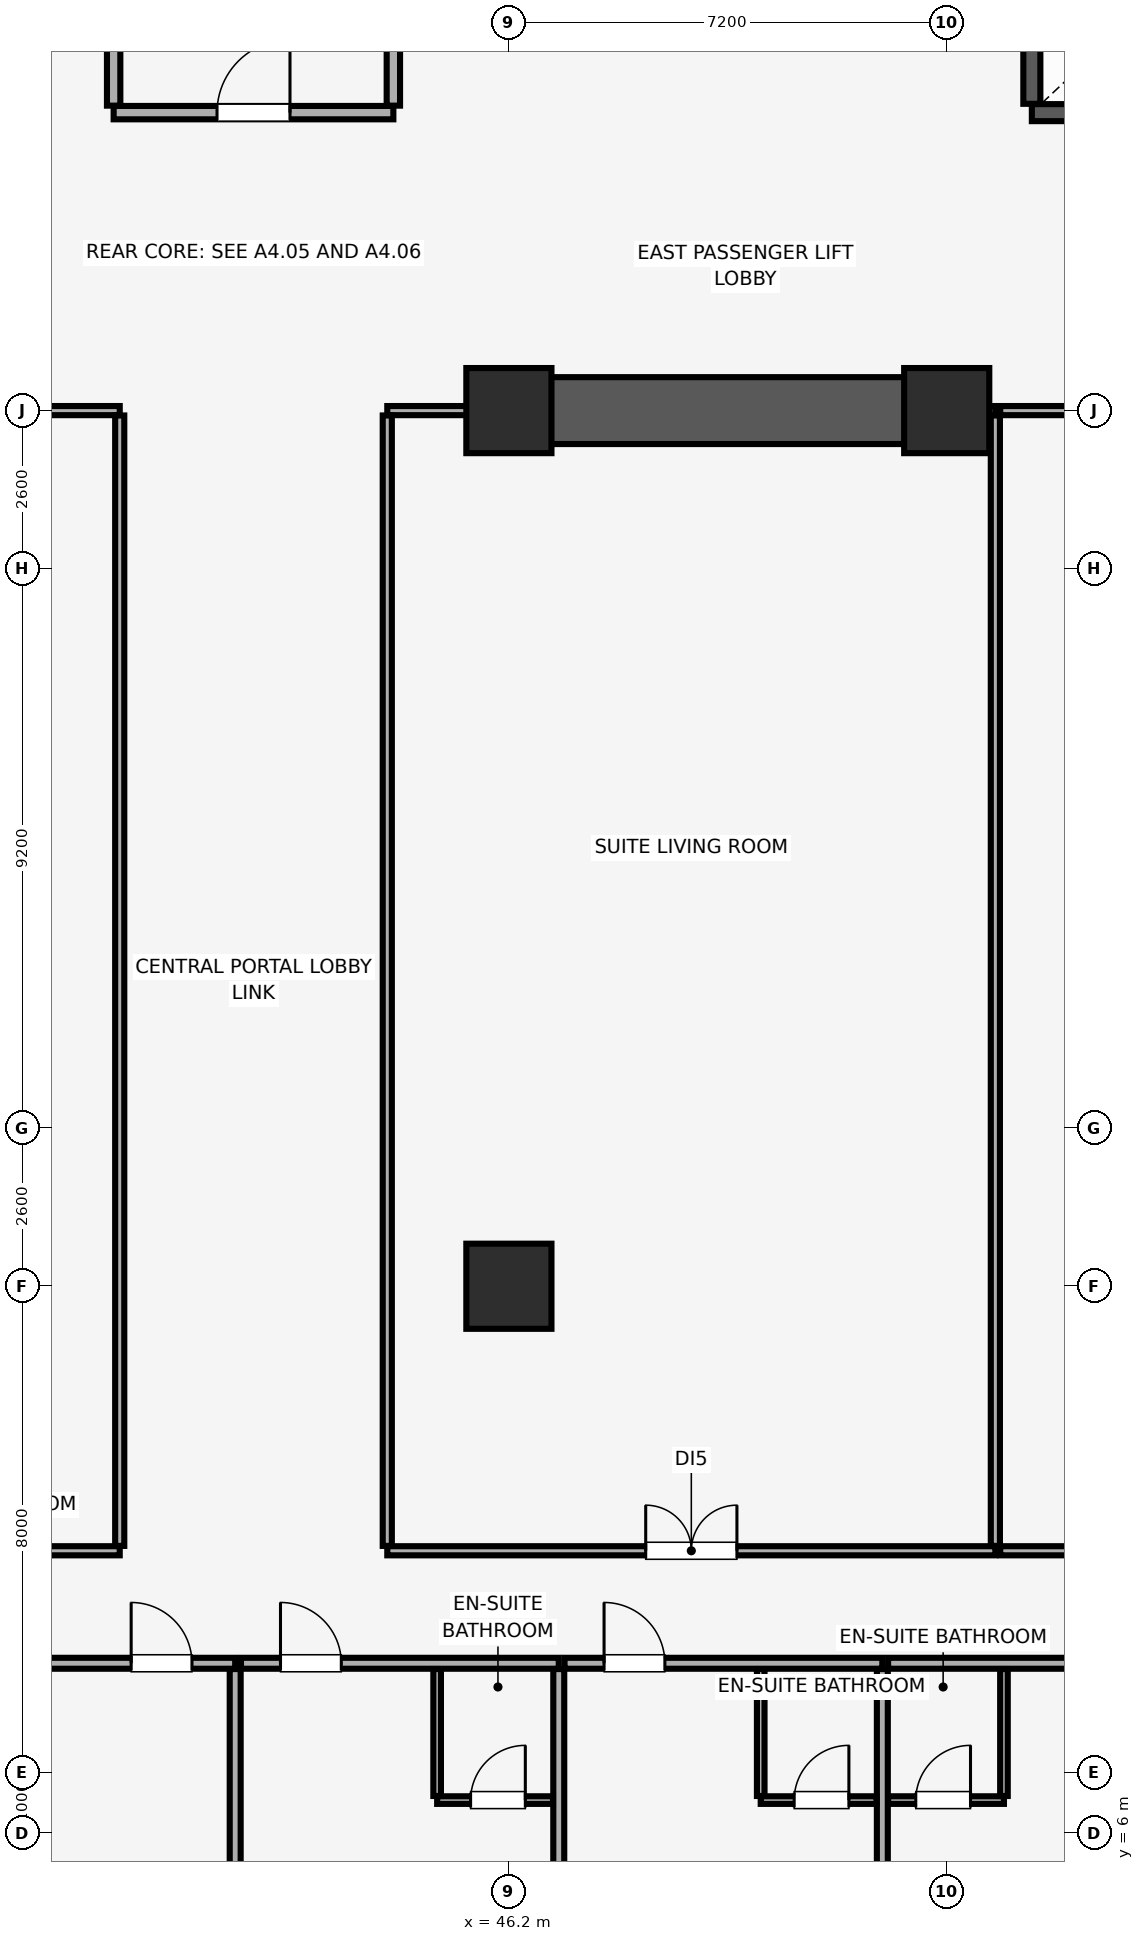
"""IFC4 building model, lengths in metres.
Left out: names, types, materials, properties, quantities, classifications, styles, units other than length and angle.
Written with IfcOpenShell. Run it as: python <this file> out.ifc"""

import sys

from ifc_helpers import new_model, si_unit, direction, frame, frame_2d, origin, origin_2d, place, context, subcontext, project, spatial, rectangle, extrude, element, fill, save


model = new_model("IFC4")
c1 = context("Model", 3, precision=1e-05, world=origin(), true_north=direction((0.0, 1.0)))
c2 = subcontext(c1, "Body", "Model", "MODEL_VIEW")
j1 = project(units=[si_unit("LENGTHUNIT", "METRE"), si_unit("PLANEANGLEUNIT", "RADIAN")], contexts=[c1])
p1 = place(None, origin())
s1 = spatial("IfcSite", under=j1, at=p1, CompositionType="ELEMENT")
p2 = place(p1, origin())
s2 = spatial("IfcBuilding", under=s1, at=p2, CompositionType="ELEMENT")
p3 = place(p2, frame((0.0, 0.0, 31.4)))
s3 = spatial("IfcBuildingStorey", under=s2, at=p3, CompositionType="ELEMENT", Elevation=31.4)
for number, where, z_axis, x_axis in (
    (1, (46.2, 15.0, 0.0), (0.0, 0.0, 1.0), (1.0, 0.0, 0.0)),
    (2, (46.2, 29.4, 0.0), (0.0, 0.0, 1.0), (1.0, 0.0, 0.0)),
    (3, (53.4, 29.4, 0.0), (0.0, 0.0, 1.0), (1.0, 0.0, 0.0)),
):
    element("IfcColumn", number, at=place(p3, frame(where, z_axis=z_axis, x_axis=x_axis)), inside=s3, PredefinedType="COLUMN", context=c2, shape_type="SweptSolid", body=[
        extrude(rectangle(XDim=1.4, YDim=1.4, at=origin_2d()), origin(), (0.0, 0.0, 1.0), 3.51),
    ])
p4 = place(p3, frame((46.0, 29.4, 0.0), z_axis=(0.0, 0.0, 1.0), x_axis=(1.0, 0.0, 0.0)))
e4 = element("IfcWall", 4, at=p4, inside=s3, PredefinedType="SHEAR", context=c2, shape_type="SweptSolid", body=[
    extrude(rectangle(XDim=7.6, YDim=1.1, at=frame_2d((3.8, 0.0))), origin(), (0.0, 0.0, 1.0), 3.51),
])
p5 = place(p3, frame((54.8, 34.3, 0.0), z_axis=(0.0, 0.0, 1.0), x_axis=(1.0, 0.0, 0.0)))
e5 = element("IfcWall", 5, at=p5, inside=s3, PredefinedType="SHEAR", context=c2, shape_type="SweptSolid", body=[
    extrude(rectangle(XDim=2.55, YDim=0.28, at=frame_2d((1.275, 0.0))), origin(), (0.0, 0.0, 1.0), 3.51),
])
p6 = place(p3, frame((54.8, 34.445, 0.0), z_axis=(0.0, 0.0, 1.0), x_axis=(0.0, 1.0, 0.0)))
e6 = element("IfcWall", 6, at=p6, inside=s3, PredefinedType="SHEAR", context=c2, shape_type="SweptSolid", body=[
    extrude(rectangle(XDim=2.11, YDim=0.28, at=frame_2d((1.055, 0.0))), origin(), (0.0, 0.0, 1.0), 3.51),
])
p7 = place(p3, frame((39.7, 34.3, 0.0), z_axis=(0.0, 0.0, 1.0), x_axis=(1.0, 0.0, 0.0)))
e7 = element("IfcWall", 7, at=p7, inside=s3, PredefinedType="PARTITIONING", context=c2, shape_type="SweptSolid", body=[
    extrude(rectangle(XDim=4.6, YDim=0.22, at=frame_2d((2.3, 0.0))), origin(), (0.0, 0.0, 1.0), 3.51),
])
p8 = place(p7, frame((1.7, 0.0, 0.0)))
e8 = element("IfcOpeningElement", 8, at=p8, cuts=e7, PredefinedType="OPENING", context=c2, shape_type="SweptSolid", body=[
    extrude(rectangle(XDim=1.2, YDim=2.15, at=frame_2d((0.6, 1.075))), frame((0.0, 0.12, 0.0), z_axis=(0.0, -1.0, 0.0), x_axis=(1.0, 0.0, 0.0)), (0.0, 0.0, 1.0), 0.24),
])
for number, where, z_axis, x_axis in (
    (9, (39.7, 34.415, 0.0), (0.0, 0.0, 1.0), (0.0, 1.0, 0.0)),
    (10, (44.3, 34.415, 0.0), (0.0, 0.0, 1.0), (0.0, 1.0, 0.0)),
):
    element("IfcWall", number, at=place(p3, frame(where, z_axis=z_axis, x_axis=x_axis)), inside=s3, PredefinedType="PARTITIONING", context=c2, shape_type="SweptSolid", body=[
        extrude(rectangle(XDim=5.785, YDim=0.22, at=frame_2d((2.893, 0.0))), origin(), (0.0, 0.0, 1.0), 3.51),
    ])
p9 = place(p3, frame((36.472, 8.8, 0.0), z_axis=(0.0, 0.0, 1.0), x_axis=(1.0, 0.0, 0.0)))
e11 = element("IfcWall", 11, at=p9, inside=s3, PredefinedType="PARTITIONING", context=c2, shape_type="SweptSolid", body=[
    extrude(rectangle(XDim=5.226, YDim=0.18, at=frame_2d((2.613, 0.0))), origin(), (0.0, 0.0, 1.0), 3.51),
])
p10 = place(p9, frame((3.516, 0.0, 0.0)))
e12 = element("IfcOpeningElement", 12, at=p10, cuts=e11, PredefinedType="OPENING", context=c2, shape_type="SweptSolid", body=[
    extrude(rectangle(XDim=1.0, YDim=2.15, at=frame_2d((0.5, 1.075))), frame((0.0, 0.1, 0.0), z_axis=(0.0, -1.0, 0.0), x_axis=(1.0, 0.0, 0.0)), (0.0, 0.0, 1.0), 0.2),
])
p11 = place(p3, frame((41.699, 0.15, 0.0), z_axis=(0.0, 0.0, 1.0), x_axis=(0.0, 1.0, 0.0)))
e13 = element("IfcWall", 13, at=p11, inside=s3, PredefinedType="PARTITIONING", context=c2, shape_type="SweptSolid", body=[
    extrude(rectangle(XDim=8.555, YDim=0.18, at=frame_2d((4.278, 0.0))), origin(), (0.0, 0.0, 1.0), 3.51),
])
p12 = place(p3, frame((41.794, 8.8, 0.0), z_axis=(0.0, 0.0, 1.0), x_axis=(1.0, 0.0, 0.0)))
e14 = element("IfcWall", 14, at=p12, inside=s3, PredefinedType="PARTITIONING", context=c2, shape_type="SweptSolid", body=[
    extrude(rectangle(XDim=5.226, YDim=0.18, at=frame_2d((2.613, 0.0))), origin(), (0.0, 0.0, 1.0), 3.51),
])
p13 = place(p12, frame((0.65, 0.0, 0.0)))
e15 = element("IfcOpeningElement", 15, at=p13, cuts=e14, PredefinedType="OPENING", context=c2, shape_type="SweptSolid", body=[
    extrude(rectangle(XDim=1.0, YDim=2.15, at=frame_2d((0.5, 1.075))), frame((0.0, 0.1, 0.0), z_axis=(0.0, -1.0, 0.0), x_axis=(1.0, 0.0, 0.0)), (0.0, 0.0, 1.0), 0.2),
])
p14 = place(p3, frame((47.02, 0.15, 0.0), z_axis=(0.0, 0.0, 1.0), x_axis=(0.0, 1.0, 0.0)))
e16 = element("IfcWall", 16, at=p14, inside=s3, PredefinedType="PARTITIONING", context=c2, shape_type="SweptSolid", body=[
    extrude(rectangle(XDim=8.555, YDim=0.18, at=frame_2d((4.278, 0.0))), origin(), (0.0, 0.0, 1.0), 3.51),
])
p15 = place(p3, frame((45.02, 6.55, 0.0), z_axis=(0.0, 0.0, 1.0), x_axis=(1.0, 0.0, 0.0)))
e17 = element("IfcWall", 17, at=p15, inside=s3, PredefinedType="PARTITIONING", context=c2, shape_type="SweptSolid", body=[
    extrude(rectangle(XDim=1.905, YDim=0.125, at=frame_2d((0.953, 0.0))), origin(), (0.0, 0.0, 1.0), 3.51),
])
p16 = place(p15, frame((0.55, 0.0, 0.0)))
e18 = element("IfcOpeningElement", 18, at=p16, cuts=e17, PredefinedType="OPENING", context=c2, shape_type="SweptSolid", body=[
    extrude(rectangle(XDim=0.9, YDim=2.1, at=frame_2d((0.45, 1.05))), frame((0.0, 0.073, 0.0), z_axis=(0.0, -1.0, 0.0), x_axis=(1.0, 0.0, 0.0)), (0.0, 0.0, 1.0), 0.145),
])
p17 = place(p3, frame((45.02, 6.617, 0.0), z_axis=(0.0, 0.0, 1.0), x_axis=(0.0, 1.0, 0.0)))
e19 = element("IfcWall", 19, at=p17, inside=s3, PredefinedType="PARTITIONING", context=c2, shape_type="SweptSolid", body=[
    extrude(rectangle(XDim=2.088, YDim=0.125, at=frame_2d((1.044, 0.0))), origin(), (0.0, 0.0, 1.0), 3.51),
])
p18 = place(p3, frame((47.115, 8.8, 0.0), z_axis=(0.0, 0.0, 1.0), x_axis=(1.0, 0.0, 0.0)))
e20 = element("IfcWall", 20, at=p18, inside=s3, PredefinedType="PARTITIONING", context=c2, shape_type="SweptSolid", body=[
    extrude(rectangle(XDim=5.226, YDim=0.18, at=frame_2d((2.613, 0.0))), origin(), (0.0, 0.0, 1.0), 3.51),
])
p19 = place(p18, frame((0.65, 0.0, 0.0)))
e21 = element("IfcOpeningElement", 21, at=p19, cuts=e20, PredefinedType="OPENING", context=c2, shape_type="SweptSolid", body=[
    extrude(rectangle(XDim=1.0, YDim=2.15, at=frame_2d((0.5, 1.075))), frame((0.0, 0.1, 0.0), z_axis=(0.0, -1.0, 0.0), x_axis=(1.0, 0.0, 0.0)), (0.0, 0.0, 1.0), 0.2),
])
p20 = place(p3, frame((52.341, 0.15, 0.0), z_axis=(0.0, 0.0, 1.0), x_axis=(0.0, 1.0, 0.0)))
e22 = element("IfcWall", 22, at=p20, inside=s3, PredefinedType="PARTITIONING", context=c2, shape_type="SweptSolid", body=[
    extrude(rectangle(XDim=8.555, YDim=0.18, at=frame_2d((4.278, 0.0))), origin(), (0.0, 0.0, 1.0), 3.51),
])
p21 = place(p3, frame((50.341, 6.55, 0.0), z_axis=(0.0, 0.0, 1.0), x_axis=(1.0, 0.0, 0.0)))
e23 = element("IfcWall", 23, at=p21, inside=s3, PredefinedType="PARTITIONING", context=c2, shape_type="SweptSolid", body=[
    extrude(rectangle(XDim=1.905, YDim=0.125, at=frame_2d((0.953, 0.0))), origin(), (0.0, 0.0, 1.0), 3.51),
])
p22 = place(p21, frame((0.55, 0.0, 0.0)))
e24 = element("IfcOpeningElement", 24, at=p22, cuts=e23, PredefinedType="OPENING", context=c2, shape_type="SweptSolid", body=[
    extrude(rectangle(XDim=0.9, YDim=2.1, at=frame_2d((0.45, 1.05))), frame((0.0, 0.073, 0.0), z_axis=(0.0, -1.0, 0.0), x_axis=(1.0, 0.0, 0.0)), (0.0, 0.0, 1.0), 0.145),
])
p23 = place(p3, frame((50.341, 6.617, 0.0), z_axis=(0.0, 0.0, 1.0), x_axis=(0.0, 1.0, 0.0)))
e25 = element("IfcWall", 25, at=p23, inside=s3, PredefinedType="PARTITIONING", context=c2, shape_type="SweptSolid", body=[
    extrude(rectangle(XDim=2.088, YDim=0.125, at=frame_2d((1.044, 0.0))), origin(), (0.0, 0.0, 1.0), 3.51),
])
p24 = place(p3, frame((52.436, 8.8, 0.0), z_axis=(0.0, 0.0, 1.0), x_axis=(1.0, 0.0, 0.0)))
e26 = element("IfcWall", 26, at=p24, inside=s3, PredefinedType="PARTITIONING", context=c2, shape_type="SweptSolid", body=[
    extrude(rectangle(XDim=5.226, YDim=0.18, at=frame_2d((2.613, 0.0))), origin(), (0.0, 0.0, 1.0), 3.51),
])
p25 = place(p24, frame((3.516, 0.0, 0.0)))
e27 = element("IfcOpeningElement", 27, at=p25, cuts=e26, PredefinedType="OPENING", context=c2, shape_type="SweptSolid", body=[
    extrude(rectangle(XDim=1.0, YDim=2.15, at=frame_2d((0.5, 1.075))), frame((0.0, 0.1, 0.0), z_axis=(0.0, -1.0, 0.0), x_axis=(1.0, 0.0, 0.0)), (0.0, 0.0, 1.0), 0.2),
])
p26 = place(p3, frame((52.436, 6.55, 0.0), z_axis=(0.0, 0.0, 1.0), x_axis=(1.0, 0.0, 0.0)))
e28 = element("IfcWall", 28, at=p26, inside=s3, PredefinedType="PARTITIONING", context=c2, shape_type="SweptSolid", body=[
    extrude(rectangle(XDim=1.905, YDim=0.125, at=frame_2d((0.953, 0.0))), origin(), (0.0, 0.0, 1.0), 3.51),
])
p27 = place(p26, frame((0.455, 0.0, 0.0)))
e29 = element("IfcOpeningElement", 29, at=p27, cuts=e28, PredefinedType="OPENING", context=c2, shape_type="SweptSolid", body=[
    extrude(rectangle(XDim=0.9, YDim=2.1, at=frame_2d((0.45, 1.05))), frame((0.0, 0.073, 0.0), z_axis=(0.0, -1.0, 0.0), x_axis=(1.0, 0.0, 0.0)), (0.0, 0.0, 1.0), 0.145),
])
p28 = place(p3, frame((54.341, 6.617, 0.0), z_axis=(0.0, 0.0, 1.0), x_axis=(0.0, 1.0, 0.0)))
e30 = element("IfcWall", 30, at=p28, inside=s3, PredefinedType="PARTITIONING", context=c2, shape_type="SweptSolid", body=[
    extrude(rectangle(XDim=2.088, YDim=0.125, at=frame_2d((1.044, 0.0))), origin(), (0.0, 0.0, 1.0), 3.51),
])
p29 = place(p3, frame((25.28, 10.65, 0.0), z_axis=(0.0, 0.0, 1.0), x_axis=(1.0, 0.0, 0.0)))
e31 = element("IfcWall", 31, at=p29, inside=s3, PredefinedType="PARTITIONING", context=c2, shape_type="SweptSolid", body=[
    extrude(rectangle(XDim=14.52, YDim=0.15, at=frame_2d((7.26, 0.0))), origin(), (0.0, 0.0, 1.0), 3.51),
])
p30 = place(p29, frame((6.47, 0.0, 0.0)))
e32 = element("IfcOpeningElement", 32, at=p30, cuts=e31, PredefinedType="OPENING", context=c2, shape_type="SweptSolid", body=[
    extrude(rectangle(XDim=1.5, YDim=2.25, at=frame_2d((0.75, 1.125))), frame((0.0, 0.085, 0.0), z_axis=(0.0, -1.0, 0.0), x_axis=(1.0, 0.0, 0.0)), (0.0, 0.0, 1.0), 0.17),
])
p31 = place(p3, frame((38.01, 29.4, 0.0), z_axis=(0.0, 0.0, 1.0), x_axis=(1.0, 0.0, 0.0)))
e33 = element("IfcWall", 33, at=p31, inside=s3, PredefinedType="PARTITIONING", context=c2, shape_type="SweptSolid", body=[
    extrude(rectangle(XDim=1.79, YDim=0.15, at=frame_2d((0.895, 0.0))), origin(), (0.0, 0.0, 1.0), 2.41),
])
p32 = place(p3, frame((39.8, 10.73, 0.0), z_axis=(0.0, 0.0, 1.0), x_axis=(0.0, 1.0, 0.0)))
e34 = element("IfcWall", 34, at=p32, inside=s3, PredefinedType="PARTITIONING", context=c2, shape_type="SweptSolid", body=[
    extrude(rectangle(XDim=18.59, YDim=0.15, at=frame_2d((9.295, 0.0))), origin(), (0.0, 0.0, 1.0), 3.51),
])
p33 = place(p3, frame((44.2, 10.65, 0.0), z_axis=(0.0, 0.0, 1.0), x_axis=(1.0, 0.0, 0.0)))
e35 = element("IfcWall", 35, at=p33, inside=s3, PredefinedType="PARTITIONING", context=c2, shape_type="SweptSolid", body=[
    extrude(rectangle(XDim=10.0, YDim=0.15, at=frame_2d((5.0, 0.0))), origin(), (0.0, 0.0, 1.0), 3.51),
])
p34 = place(p33, frame((4.25, 0.0, 0.0)))
e36 = element("IfcOpeningElement", 36, at=p34, cuts=e35, PredefinedType="OPENING", context=c2, shape_type="SweptSolid", body=[
    extrude(rectangle(XDim=1.5, YDim=2.25, at=frame_2d((0.75, 1.125))), frame((0.0, 0.085, 0.0), z_axis=(0.0, -1.0, 0.0), x_axis=(1.0, 0.0, 0.0)), (0.0, 0.0, 1.0), 0.17),
])
p35 = place(p3, frame((44.2, 29.4, 0.0), z_axis=(0.0, 0.0, 1.0), x_axis=(1.0, 0.0, 0.0)))
e37 = element("IfcWall", 37, at=p35, inside=s3, PredefinedType="PARTITIONING", context=c2, shape_type="SweptSolid", body=[
    extrude(rectangle(XDim=1.79, YDim=0.15, at=frame_2d((0.895, 0.0))), origin(), (0.0, 0.0, 1.0), 2.41),
])
p36 = place(p3, frame((53.61, 29.4, 0.0), z_axis=(0.0, 0.0, 1.0), x_axis=(1.0, 0.0, 0.0)))
e38 = element("IfcWall", 38, at=p36, inside=s3, PredefinedType="PARTITIONING", context=c2, shape_type="SweptSolid", body=[
    extrude(rectangle(XDim=0.59, YDim=0.15, at=frame_2d((0.295, 0.0))), origin(), (0.0, 0.0, 1.0), 2.41),
])
for number, where, z_axis, x_axis in (
    (39, (44.2, 10.73, 0.0), (0.0, 0.0, 1.0), (0.0, 1.0, 0.0)),
    (40, (54.2, 10.73, 0.0), (0.0, 0.0, 1.0), (0.0, 1.0, 0.0)),
):
    element("IfcWall", number, at=place(p3, frame(where, z_axis=z_axis, x_axis=x_axis)), inside=s3, PredefinedType="PARTITIONING", context=c2, shape_type="SweptSolid", body=[
        extrude(rectangle(XDim=18.59, YDim=0.15, at=frame_2d((9.295, 0.0))), origin(), (0.0, 0.0, 1.0), 3.51),
    ])
p37 = place(p3, frame((54.28, 10.65, 0.0), z_axis=(0.0, 0.0, 1.0), x_axis=(1.0, 0.0, 0.0)))
e41 = element("IfcWall", 41, at=p37, inside=s3, PredefinedType="PARTITIONING", context=c2, shape_type="SweptSolid", body=[
    extrude(rectangle(XDim=13.92, YDim=0.15, at=frame_2d((6.96, 0.0))), origin(), (0.0, 0.0, 1.0), 3.51),
])
p38 = place(p37, frame((6.92, 0.0, 0.0)))
e42 = element("IfcOpeningElement", 42, at=p38, cuts=e41, PredefinedType="OPENING", context=c2, shape_type="SweptSolid", body=[
    extrude(rectangle(XDim=1.5, YDim=2.25, at=frame_2d((0.75, 1.125))), frame((0.0, 0.085, 0.0), z_axis=(0.0, -1.0, 0.0), x_axis=(1.0, 0.0, 0.0)), (0.0, 0.0, 1.0), 0.17),
])
p39 = place(p3, frame((54.28, 29.4, 0.0), z_axis=(0.0, 0.0, 1.0), x_axis=(1.0, 0.0, 0.0)))
e43 = element("IfcWall", 43, at=p39, inside=s3, PredefinedType="PARTITIONING", context=c2, shape_type="SweptSolid", body=[
    extrude(rectangle(XDim=6.11, YDim=0.15, at=frame_2d((3.055, 0.0))), origin(), (0.0, 0.0, 1.0), 2.41),
])
p40 = place(p8, origin())
e44 = element("IfcDoor", 44, at=p40, inside=s3, OperationType="SINGLE_SWING_RIGHT", PredefinedType="DOOR", context=c2, shape_type="SweptSolid", body=[
    extrude(rectangle(XDim=1.2, YDim=2.15, at=frame_2d((0.6, 1.075))), frame((0.0, 0.025, 0.0), z_axis=(0.0, -1.0, 0.0), x_axis=(1.0, 0.0, 0.0)), (0.0, 0.0, 1.0), 0.05),
])
fill(e8, e44)
p41 = place(p10, origin())
e45 = element("IfcDoor", 45, at=p41, inside=s3, OperationType="SINGLE_SWING_LEFT", PredefinedType="DOOR", context=c2, shape_type="SweptSolid", body=[
    extrude(rectangle(XDim=1.0, YDim=2.15, at=frame_2d((0.5, 1.075))), frame((0.0, 0.025, 0.0), z_axis=(0.0, -1.0, 0.0), x_axis=(1.0, 0.0, 0.0)), (0.0, 0.0, 1.0), 0.05),
])
fill(e12, e45)
p42 = place(p13, origin())
e46 = element("IfcDoor", 46, at=p42, inside=s3, OperationType="SINGLE_SWING_LEFT", PredefinedType="DOOR", context=c2, shape_type="SweptSolid", body=[
    extrude(rectangle(XDim=1.0, YDim=2.15, at=frame_2d((0.5, 1.075))), frame((0.0, 0.025, 0.0), z_axis=(0.0, -1.0, 0.0), x_axis=(1.0, 0.0, 0.0)), (0.0, 0.0, 1.0), 0.05),
])
fill(e15, e46)
p43 = place(p16, origin())
e47 = element("IfcDoor", 47, at=p43, inside=s3, OperationType="SINGLE_SWING_RIGHT", PredefinedType="DOOR", context=c2, shape_type="SweptSolid", body=[
    extrude(rectangle(XDim=0.9, YDim=2.1, at=frame_2d((0.45, 1.05))), frame((0.0, 0.025, 0.0), z_axis=(0.0, -1.0, 0.0), x_axis=(1.0, 0.0, 0.0)), (0.0, 0.0, 1.0), 0.05),
])
fill(e18, e47)
p44 = place(p19, origin())
e48 = element("IfcDoor", 48, at=p44, inside=s3, OperationType="SINGLE_SWING_LEFT", PredefinedType="DOOR", context=c2, shape_type="SweptSolid", body=[
    extrude(rectangle(XDim=1.0, YDim=2.15, at=frame_2d((0.5, 1.075))), frame((0.0, 0.025, 0.0), z_axis=(0.0, -1.0, 0.0), x_axis=(1.0, 0.0, 0.0)), (0.0, 0.0, 1.0), 0.05),
])
fill(e21, e48)
p45 = place(p22, origin())
e49 = element("IfcDoor", 49, at=p45, inside=s3, OperationType="SINGLE_SWING_RIGHT", PredefinedType="DOOR", context=c2, shape_type="SweptSolid", body=[
    extrude(rectangle(XDim=0.9, YDim=2.1, at=frame_2d((0.45, 1.05))), frame((0.0, 0.025, 0.0), z_axis=(0.0, -1.0, 0.0), x_axis=(1.0, 0.0, 0.0)), (0.0, 0.0, 1.0), 0.05),
])
fill(e24, e49)
p46 = place(p27, origin())
e50 = element("IfcDoor", 50, at=p46, inside=s3, OperationType="SINGLE_SWING_RIGHT", PredefinedType="DOOR", context=c2, shape_type="SweptSolid", body=[
    extrude(rectangle(XDim=0.9, YDim=2.1, at=frame_2d((0.45, 1.05))), frame((0.0, 0.025, 0.0), z_axis=(0.0, -1.0, 0.0), x_axis=(1.0, 0.0, 0.0)), (0.0, 0.0, 1.0), 0.05),
])
fill(e29, e50)
p47 = place(p34, origin())
e51 = element("IfcDoor", 51, at=p47, inside=s3, OperationType="DOUBLE_DOOR_SINGLE_SWING", PredefinedType="DOOR", context=c2, shape_type="SweptSolid", body=[
    extrude(rectangle(XDim=1.5, YDim=2.25, at=frame_2d((0.75, 1.125))), frame((0.0, 0.025, 0.0), z_axis=(0.0, -1.0, 0.0), x_axis=(1.0, 0.0, 0.0)), (0.0, 0.0, 1.0), 0.05),
])
fill(e36, e51)
save(model, sys.argv[1])
